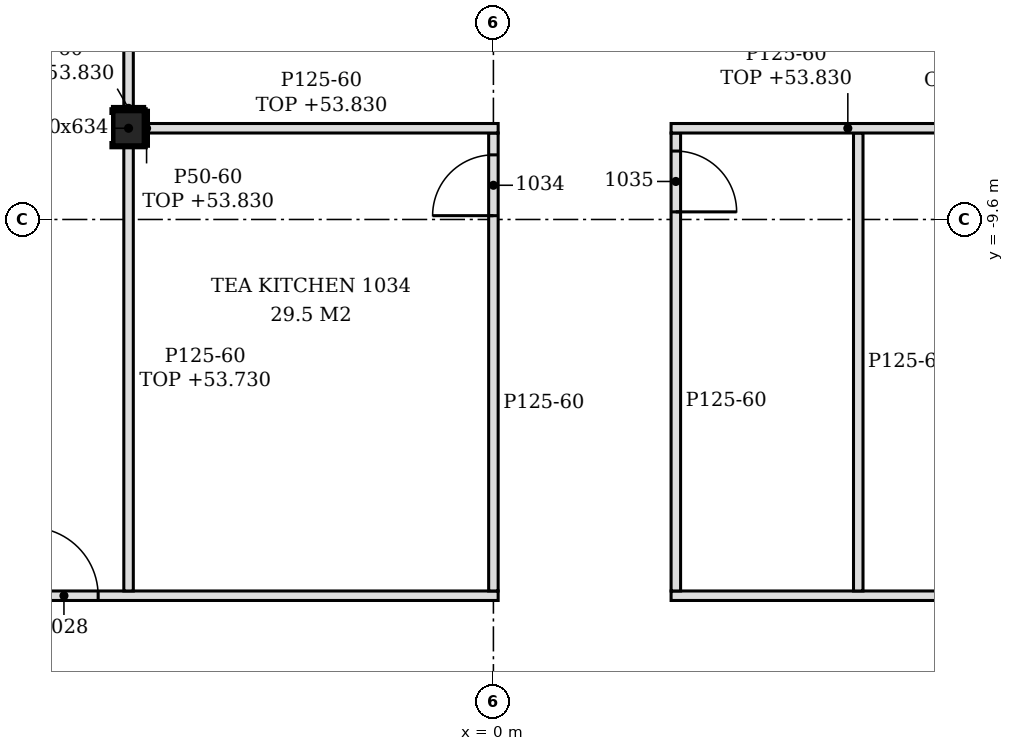
"""IFC4 building model, lengths in metres.
Left out: names, types, materials, properties, quantities, classifications, styles, units other than length and angle.
Written with IfcOpenShell. Run it as: python <this file> out.ifc"""

import sys

from ifc_helpers import new_model, si_unit, direction, frame, frame_2d, origin, origin_2d, place, context, subcontext, project, spatial, polyline, rectangle, i_section, outline, extrude, element, fill, save


model = new_model("IFC4")
c1 = context("Model", 3, precision=1e-05, world=origin(), true_north=direction((0.0, 1.0)))
c2 = subcontext(c1, "Body", "Model", "MODEL_VIEW")
j1 = project(units=[si_unit("LENGTHUNIT", "METRE"), si_unit("PLANEANGLEUNIT", "RADIAN")], contexts=[c1])
p1 = place(None, origin())
s1 = spatial("IfcSite", under=j1, at=p1, CompositionType="ELEMENT")
p2 = place(p1, origin())
s2 = spatial("IfcBuilding", under=s1, at=p2, CompositionType="ELEMENT")
p3 = place(p2, frame((0.0, 0.0, 51.0)))
s3 = spatial("IfcBuildingStorey", under=s2, at=p3, CompositionType="ELEMENT", Elevation=51.0)
p4 = place(p3, frame((-4.8, -8.4, -0.15), z_axis=(0.0, 0.0, 1.0), x_axis=(1.0, 0.0, 0.0)))
e1 = element("IfcColumn", 1, at=p4, inside=s3, PredefinedType="COLUMN", context=c2, shape_type="SweptSolid", body=[
    extrude(i_section(OverallWidth=0.424, OverallDepth=0.474, WebThickness=0.048, FlangeThickness=0.077, FilletRadius=0.015, at=origin_2d()), origin(), (0.0, 0.0, 1.0), 3.6),
])
p5 = place(p3, frame((-19.012, -14.55, 0.0), z_axis=(0.0, 0.0, 1.0), x_axis=(1.0, 0.0, 0.0)))
e2 = element("IfcWall", 2, at=p5, inside=s3, PredefinedType="PARTITIONING", context=c2, shape_type="SweptSolid", body=[
    extrude(outline(polyline([(0.0, 0.0), (19.075, 0.0), (19.075, 3.45), (14.363, 3.45), (14.361, 2.73), (14.062, 2.73), (14.061, 3.45), (4.762, 3.45), (4.76, 2.93), (4.462, 2.93), (4.46, 2.83), (0.0, 2.83), (0.0, 0.0)])), frame((0.0, 0.062, 0.0), z_axis=(0.0, -1.0, 0.0), x_axis=(1.0, 0.0, 0.0)), (0.0, 0.0, 1.0), 0.125),
])
p6 = place(p5, frame((12.913, 0.0, 0.0)))
e3 = element("IfcOpeningElement", 3, at=p6, cuts=e2, PredefinedType="OPENING", context=c2, shape_type="SweptSolid", body=[
    extrude(rectangle(XDim=0.9, YDim=2.1, at=frame_2d((0.45, 1.05))), frame((0.0, 0.073, 0.0), z_axis=(0.0, -1.0, 0.0), x_axis=(1.0, 0.0, 0.0)), (0.0, 0.0, 1.0), 0.145),
])
p7 = place(p3, frame((2.337, -14.55, 0.0), z_axis=(0.0, 0.0, 1.0), x_axis=(1.0, 0.0, 0.0)))
e4 = element("IfcWall", 4, at=p7, inside=s3, PredefinedType="PARTITIONING", context=c2, shape_type="SweptSolid", body=[
    extrude(outline(polyline([(0.0, 0.0), (14.525, 0.0), (14.525, 3.45), (5.012, 3.45), (5.01, 2.73), (4.712, 2.73), (4.71, 3.45), (0.0, 3.45), (0.0, 0.0)])), frame((0.0, 0.062, 0.0), z_axis=(0.0, -1.0, 0.0), x_axis=(1.0, 0.0, 0.0)), (0.0, 0.0, 1.0), 0.125),
])
p8 = place(p3, frame((-4.8, -14.488, 0.0), z_axis=(0.0, 0.0, 1.0), x_axis=(0.0, 1.0, 0.0)))
e5 = element("IfcWall", 5, at=p8, inside=s3, PredefinedType="PARTITIONING", context=c2, shape_type="SweptSolid", body=[
    extrude(rectangle(XDim=5.851, YDim=0.125, at=frame_2d((2.925, 0.0))), origin(), (0.0, 0.0, 1.0), 2.73),
])
p9 = place(p3, frame((0.0, -14.488, 0.0), z_axis=(0.0, 0.0, 1.0), x_axis=(0.0, 1.0, 0.0)))
e6 = element("IfcWall", 6, at=p9, inside=s3, PredefinedType="PARTITIONING", context=c2, shape_type="SweptSolid", body=[
    extrude(outline(polyline([(0.0, 0.0), (6.025, 0.0), (6.025, 2.83), (5.938, 2.83), (5.936, 3.45), (0.192, 3.45), (0.19, 2.88), (0.0, 2.88), (0.0, 0.0)])), frame((0.0, 0.062, 0.0), z_axis=(0.0, -1.0, 0.0), x_axis=(1.0, 0.0, 0.0)), (0.0, 0.0, 1.0), 0.125),
])
p10 = place(p9, frame((4.938, 0.0, 0.0)))
e7 = element("IfcOpeningElement", 7, at=p10, cuts=e6, PredefinedType="OPENING", context=c2, shape_type="SweptSolid", body=[
    extrude(rectangle(XDim=0.8, YDim=2.1, at=frame_2d((0.4, 1.05))), frame((0.0, 0.073, 0.0), z_axis=(0.0, -1.0, 0.0), x_axis=(1.0, 0.0, 0.0)), (0.0, 0.0, 1.0), 0.145),
])
p11 = place(p3, frame((2.4, -14.488, 0.0), z_axis=(0.0, 0.0, 1.0), x_axis=(0.0, 1.0, 0.0)))
e8 = element("IfcWall", 8, at=p11, inside=s3, PredefinedType="PARTITIONING", context=c2, shape_type="SweptSolid", body=[
    extrude(outline(polyline([(0.0, 0.0), (6.025, 0.0), (6.025, 2.83), (5.938, 2.83), (5.936, 3.45), (0.192, 3.45), (0.19, 2.88), (0.0, 2.88), (0.0, 0.0)])), frame((0.0, 0.062, 0.0), z_axis=(0.0, -1.0, 0.0), x_axis=(1.0, 0.0, 0.0)), (0.0, 0.0, 1.0), 0.125),
])
p12 = place(p11, frame((4.988, 0.0, 0.0)))
e9 = element("IfcOpeningElement", 9, at=p12, cuts=e8, PredefinedType="OPENING", context=c2, shape_type="SweptSolid", body=[
    extrude(rectangle(XDim=0.8, YDim=2.1, at=frame_2d((0.4, 1.05))), frame((0.0, 0.073, 0.0), z_axis=(0.0, -1.0, 0.0), x_axis=(1.0, 0.0, 0.0)), (0.0, 0.0, 1.0), 0.145),
])
p13 = place(p3, frame((4.8, -14.488, 0.0), z_axis=(0.0, 0.0, 1.0), x_axis=(0.0, 1.0, 0.0)))
e10 = element("IfcWall", 10, at=p13, inside=s3, PredefinedType="PARTITIONING", context=c2, shape_type="SweptSolid", body=[
    extrude(outline(polyline([(0.0, 0.0), (6.025, 0.0), (6.025, 2.83), (5.938, 2.83), (5.936, 3.45), (0.192, 3.45), (0.19, 2.88), (0.0, 2.88), (0.0, 0.0)])), frame((0.0, 0.062, 0.0), z_axis=(0.0, -1.0, 0.0), x_axis=(1.0, 0.0, 0.0)), (0.0, 0.0, 1.0), 0.125),
])
p14 = place(p3, frame((-4.588, -8.4, 0.0), z_axis=(0.0, 0.0, 1.0), x_axis=(1.0, 0.0, 0.0)))
e11 = element("IfcWall", 11, at=p14, inside=s3, PredefinedType="PARTITIONING", context=c2, shape_type="SweptSolid", body=[
    extrude(rectangle(XDim=4.65, YDim=0.125, at=frame_2d((2.325, 0.0))), origin(), (0.0, 0.0, 1.0), 2.83),
])
p15 = place(p3, frame((2.337, -8.4, 0.0), z_axis=(0.0, 0.0, 1.0), x_axis=(1.0, 0.0, 0.0)))
e12 = element("IfcWall", 12, at=p15, inside=s3, PredefinedType="PARTITIONING", context=c2, shape_type="SweptSolid", body=[
    extrude(rectangle(XDim=4.651, YDim=0.125, at=frame_2d((2.325, 0.0))), origin(), (0.0, 0.0, 1.0), 2.83),
])
p16 = place(p3, frame((-4.8, -8.163, 0.0), z_axis=(0.0, 0.0, 1.0), x_axis=(0.0, 1.0, 0.0)))
e13 = element("IfcWall", 13, at=p16, inside=s3, PredefinedType="PARTITIONING", context=c2, shape_type="SweptSolid", body=[
    extrude(rectangle(XDim=8.101, YDim=0.125, at=frame_2d((4.05, 0.0))), origin(), (0.0, 0.0, 1.0), 2.83),
])
p17 = place(p3, frame((-4.563, -8.637, 0.0), z_axis=(0.0, 0.0, 1.0), x_axis=(0.0, 1.0, 0.0)))
e14 = element("IfcWall", 14, at=p17, inside=s3, PredefinedType="PARTITIONING", context=c2, shape_type="SweptSolid", body=[
    extrude(rectangle(XDim=0.474, YDim=0.05, at=frame_2d((0.237, 0.0))), origin(), (0.0, 0.0, 1.0), 2.83),
])
p18 = place(p3, frame((-5.012, -8.138, 0.0), z_axis=(0.0, 0.0, 1.0), x_axis=(1.0, 0.0, 0.0)))
e15 = element("IfcWall", 15, at=p18, inside=s3, PredefinedType="PARTITIONING", context=c2, shape_type="SweptSolid", body=[
    extrude(rectangle(XDim=0.424, YDim=0.05, at=frame_2d((0.212, 0.0))), origin(), (0.0, 0.0, 1.0), 2.83),
])
p19 = place(p6, origin())
e16 = element("IfcDoor", 16, at=p19, inside=s3, OperationType="SINGLE_SWING_LEFT", PredefinedType="DOOR", context=c2, shape_type="SweptSolid", body=[
    extrude(rectangle(XDim=0.9, YDim=2.1, at=frame_2d((0.45, 1.05))), frame((0.0, 0.025, 0.0), z_axis=(0.0, -1.0, 0.0), x_axis=(1.0, 0.0, 0.0)), (0.0, 0.0, 1.0), 0.05),
])
fill(e3, e16)
p20 = place(p10, origin())
e17 = element("IfcDoor", 17, at=p20, inside=s3, OperationType="SINGLE_SWING_LEFT", PredefinedType="DOOR", context=c2, shape_type="SweptSolid", body=[
    extrude(rectangle(XDim=0.8, YDim=2.1, at=frame_2d((0.4, 1.05))), frame((0.0, 0.025, 0.0), z_axis=(0.0, -1.0, 0.0), x_axis=(1.0, 0.0, 0.0)), (0.0, 0.0, 1.0), 0.05),
])
fill(e7, e17)
p21 = place(p12, frame((0.8, 0.0, 0.0), z_axis=(0.0, 0.0, 1.0), x_axis=(-1.0, 0.0, 0.0)))
e18 = element("IfcDoor", 18, at=p21, inside=s3, OperationType="SINGLE_SWING_RIGHT", PredefinedType="DOOR", context=c2, shape_type="SweptSolid", body=[
    extrude(rectangle(XDim=0.8, YDim=2.1, at=frame_2d((0.4, 1.05))), frame((0.0, 0.025, 0.0), z_axis=(0.0, -1.0, 0.0), x_axis=(1.0, 0.0, 0.0)), (0.0, 0.0, 1.0), 0.05),
])
fill(e9, e18)
save(model, sys.argv[1])
